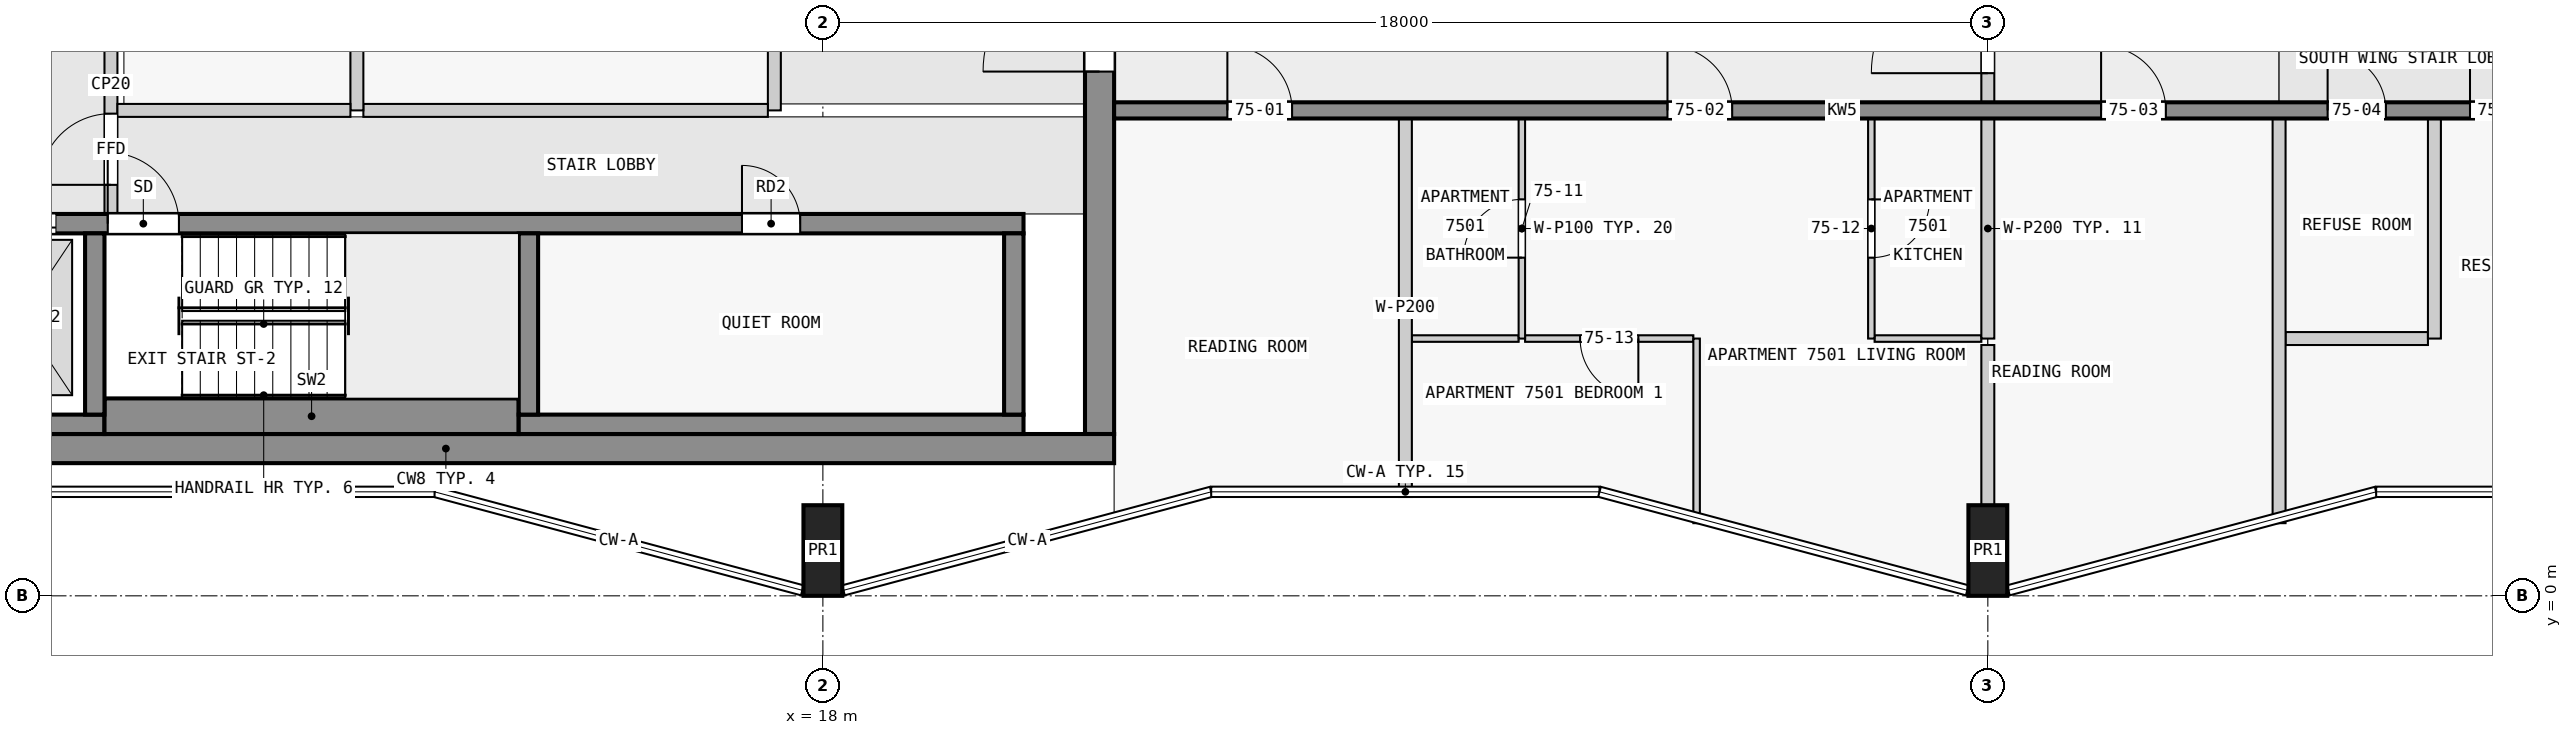
"""IFC4 building model, lengths in metres.
Left out: names, types, materials, properties, quantities, classifications, styles, units other than length and angle.
Written with IfcOpenShell. Run it as: python <this file> out.ifc"""

import sys

from ifc_helpers import new_model, si_unit, direction, frame, frame_2d, origin, origin_2d, place, context, subcontext, project, spatial, rectangle, extrude, element, fill, save


model = new_model("IFC4")
c1 = context("Model", 3, precision=1e-05, world=origin(), true_north=direction((0.0, 1.0)))
c2 = subcontext(c1, "Body", "Model", "MODEL_VIEW")
j1 = project(units=[si_unit("LENGTHUNIT", "METRE"), si_unit("PLANEANGLEUNIT", "RADIAN")], contexts=[c1])
p1 = place(None, origin())
s1 = spatial("IfcSite", under=j1, at=p1, CompositionType="ELEMENT")
p2 = place(p1, origin())
s2 = spatial("IfcBuilding", under=s1, at=p2, CompositionType="ELEMENT")
p3 = place(p2, frame((0.0, 0.0, 284.4)))
s3 = spatial("IfcBuildingStorey", under=s2, at=p3, CompositionType="ELEMENT", Elevation=284.4)
for number, where, z_axis, x_axis in (
    (1, (18.0, 0.7, 0.0), (0.0, 0.0, 1.0), (1.0, 0.0, 0.0)),
    (2, (36.0, 0.7, 0.0), (0.0, 0.0, 1.0), (1.0, 0.0, 0.0)),
):
    element("IfcColumn", number, at=place(p3, frame(where, z_axis=z_axis, x_axis=x_axis)), inside=s3, PredefinedType="COLUMN", context=c2, shape_type="SweptSolid", body=[
        extrude(rectangle(XDim=0.6, YDim=1.4, at=origin_2d()), origin(), (0.0, 0.0, 1.0), 3.5),
    ])
p4 = place(p3, frame((1.85, 2.275, 0.0), z_axis=(0.0, 0.0, 1.0), x_axis=(1.0, 0.0, 0.0)))
e3 = element("IfcWall", 3, at=p4, inside=s3, PredefinedType="SHEAR", context=c2, shape_type="SweptSolid", body=[
    extrude(rectangle(XDim=20.65, YDim=0.45, at=frame_2d((10.325, 0.0))), origin(), (0.0, 0.0, 1.0), 3.05),
])
p5 = place(p3, frame((22.275, 2.5, 0.0), z_axis=(0.0, 0.0, 1.0), x_axis=(0.0, 1.0, 0.0)))
e4 = element("IfcWall", 4, at=p5, inside=s3, PredefinedType="SHEAR", context=c2, shape_type="SweptSolid", body=[
    extrude(rectangle(XDim=15.05, YDim=0.45, at=frame_2d((7.525, 0.0))), origin(), (0.0, 0.0, 1.0), 3.05),
])
p6 = place(p5, frame((5.6, 0.0, 0.0)))
e5 = element("IfcOpeningElement", 5, at=p6, cuts=e4, PredefinedType="OPENING", context=c2, shape_type="SweptSolid", body=[
    extrude(rectangle(XDim=1.8, YDim=2.1, at=frame_2d((0.9, 1.05))), frame((0.0, 0.235, 0.0), z_axis=(0.0, -1.0, 0.0), x_axis=(1.0, 0.0, 0.0)), (0.0, 0.0, 1.0), 0.47),
])
p7 = place(p3, frame((2.3, 2.65, 0.0), z_axis=(0.0, 0.0, 1.0), x_axis=(1.0, 0.0, 0.0)))
e6 = element("IfcWall", 6, at=p7, inside=s3, PredefinedType="SHEAR", context=c2, shape_type="SweptSolid", body=[
    extrude(rectangle(XDim=4.6, YDim=0.3, at=frame_2d((2.3, 0.0))), origin(), (0.0, 0.0, 1.0), 3.05),
])
p8 = place(p3, frame((6.9, 2.775, 0.0), z_axis=(0.0, 0.0, 1.0), x_axis=(1.0, 0.0, 0.0)))
e7 = element("IfcWall", 7, at=p8, inside=s3, PredefinedType="SHEAR", context=c2, shape_type="SweptSolid", body=[
    extrude(rectangle(XDim=6.4, YDim=0.55, at=frame_2d((3.2, 0.0))), origin(), (0.0, 0.0, 1.0), 3.05),
])
p9 = place(p3, frame((13.3, 2.65, 0.0), z_axis=(0.0, 0.0, 1.0), x_axis=(1.0, 0.0, 0.0)))
e8 = element("IfcWall", 8, at=p9, inside=s3, PredefinedType="SHEAR", context=c2, shape_type="SweptSolid", body=[
    extrude(rectangle(XDim=7.8, YDim=0.3, at=frame_2d((3.9, 0.0))), origin(), (0.0, 0.0, 1.0), 3.05),
])
for number, where, z_axis, x_axis in (
    (9, (6.75, 2.8, 0.0), (0.0, 0.0, 1.0), (0.0, 1.0, 0.0)),
    (10, (13.45, 2.8, 0.0), (0.0, 0.0, 1.0), (0.0, 1.0, 0.0)),
    (11, (20.95, 2.8, 0.0), (0.0, 0.0, 1.0), (0.0, 1.0, 0.0)),
):
    element("IfcWall", number, at=place(p3, frame(where, z_axis=z_axis, x_axis=x_axis)), inside=s3, PredefinedType="SHEAR", context=c2, shape_type="SweptSolid", body=[
        extrude(rectangle(XDim=2.8, YDim=0.3, at=frame_2d((1.4, 0.0))), origin(), (0.0, 0.0, 1.0), 3.05),
    ])
p10 = place(p3, frame((2.3, 5.75, 0.0), z_axis=(0.0, 0.0, 1.0), x_axis=(1.0, 0.0, 0.0)))
e12 = element("IfcWall", 12, at=p10, inside=s3, PredefinedType="SHEAR", context=c2, shape_type="SweptSolid", body=[
    extrude(rectangle(XDim=18.8, YDim=0.3, at=frame_2d((9.4, 0.0))), origin(), (0.0, 0.0, 1.0), 3.05),
])
p11 = place(p10, frame((4.65, 0.0, 0.0)))
e13 = element("IfcOpeningElement", 13, at=p11, cuts=e12, PredefinedType="OPENING", context=c2, shape_type="SweptSolid", body=[
    extrude(rectangle(XDim=1.1, YDim=2.1, at=frame_2d((0.55, 1.05))), frame((0.0, 0.16, 0.0), z_axis=(0.0, -1.0, 0.0), x_axis=(1.0, 0.0, 0.0)), (0.0, 0.0, 1.0), 0.32),
])
p12 = place(p10, frame((0.45, 0.0, 0.0)))
e14 = element("IfcOpeningElement", 14, at=p12, cuts=e12, PredefinedType="OPENING", context=c2, shape_type="SweptSolid", body=[
    extrude(rectangle(XDim=1.1, YDim=2.1, at=frame_2d((0.55, 1.05))), frame((0.0, 0.16, 0.0), z_axis=(0.0, -1.0, 0.0), x_axis=(1.0, 0.0, 0.0)), (0.0, 0.0, 1.0), 0.32),
])
p13 = place(p10, frame((2.75, 0.0, 0.0)))
e15 = element("IfcOpeningElement", 15, at=p13, cuts=e12, PredefinedType="OPENING", context=c2, shape_type="SweptSolid", body=[
    extrude(rectangle(XDim=1.1, YDim=2.1, at=frame_2d((0.55, 1.05))), frame((0.0, 0.16, 0.0), z_axis=(0.0, -1.0, 0.0), x_axis=(1.0, 0.0, 0.0)), (0.0, 0.0, 1.0), 0.32),
])
p14 = place(p10, frame((14.45, 0.0, 0.0)))
e16 = element("IfcOpeningElement", 16, at=p14, cuts=e12, PredefinedType="OPENING", context=c2, shape_type="SweptSolid", body=[
    extrude(rectangle(XDim=0.9, YDim=2.1, at=frame_2d((0.45, 1.05))), frame((0.0, 0.16, 0.0), z_axis=(0.0, -1.0, 0.0), x_axis=(1.0, 0.0, 0.0)), (0.0, 0.0, 1.0), 0.32),
])
p15 = place(p3, frame((22.5, 7.5, 0.0), z_axis=(0.0, 0.0, 1.0), x_axis=(1.0, 0.0, 0.0)))
e17 = element("IfcWall", 17, at=p15, inside=s3, PredefinedType="SHEAR", context=c2, shape_type="SweptSolid", body=[
    extrude(rectangle(XDim=22.5, YDim=0.25, at=frame_2d((11.25, 0.0))), origin(), (0.0, 0.0, 1.0), 3.05),
])
p16 = place(p15, frame((1.75, 0.0, 0.0)))
e18 = element("IfcOpeningElement", 18, at=p16, cuts=e17, PredefinedType="OPENING", context=c2, shape_type="SweptSolid", body=[
    extrude(rectangle(XDim=1.0, YDim=2.1, at=frame_2d((0.5, 1.05))), frame((0.0, 0.135, 0.0), z_axis=(0.0, -1.0, 0.0), x_axis=(1.0, 0.0, 0.0)), (0.0, 0.0, 1.0), 0.27),
])
p17 = place(p15, frame((8.55, 0.0, 0.0)))
e19 = element("IfcOpeningElement", 19, at=p17, cuts=e17, PredefinedType="OPENING", context=c2, shape_type="SweptSolid", body=[
    extrude(rectangle(XDim=1.0, YDim=2.1, at=frame_2d((0.5, 1.05))), frame((0.0, 0.135, 0.0), z_axis=(0.0, -1.0, 0.0), x_axis=(1.0, 0.0, 0.0)), (0.0, 0.0, 1.0), 0.27),
])
p18 = place(p15, frame((15.25, 0.0, 0.0)))
e20 = element("IfcOpeningElement", 20, at=p18, cuts=e17, PredefinedType="OPENING", context=c2, shape_type="SweptSolid", body=[
    extrude(rectangle(XDim=1.0, YDim=2.1, at=frame_2d((0.5, 1.05))), frame((0.0, 0.135, 0.0), z_axis=(0.0, -1.0, 0.0), x_axis=(1.0, 0.0, 0.0)), (0.0, 0.0, 1.0), 0.27),
])
p19 = place(p15, frame((18.75, 0.0, 0.0)))
e21 = element("IfcOpeningElement", 21, at=p19, cuts=e17, PredefinedType="OPENING", context=c2, shape_type="SweptSolid", body=[
    extrude(rectangle(XDim=0.9, YDim=2.1, at=frame_2d((0.45, 1.05))), frame((0.0, 0.135, 0.0), z_axis=(0.0, -1.0, 0.0), x_axis=(1.0, 0.0, 0.0)), (0.0, 0.0, 1.0), 0.27),
])
p20 = place(p15, frame((20.95, 0.0, 0.0)))
e22 = element("IfcOpeningElement", 22, at=p20, cuts=e17, PredefinedType="OPENING", context=c2, shape_type="SweptSolid", body=[
    extrude(rectangle(XDim=1.0, YDim=2.1, at=frame_2d((0.5, 1.05))), frame((0.0, 0.135, 0.0), z_axis=(0.0, -1.0, 0.0), x_axis=(1.0, 0.0, 0.0)), (0.0, 0.0, 1.0), 0.27),
])
p21 = place(p3, frame((7.0, 5.9, 0.0), z_axis=(0.0, 0.0, 1.0), x_axis=(0.0, 1.0, 0.0)))
e23 = element("IfcWall", 23, at=p21, inside=s3, PredefinedType="PARTITIONING", context=c2, shape_type="SweptSolid", body=[
    extrude(rectangle(XDim=4.0, YDim=0.2, at=frame_2d((2.0, 0.0))), origin(), (0.0, 0.0, 1.0), 3.05),
])
p22 = place(p21, frame((0.45, 0.0, 0.0)))
e24 = element("IfcOpeningElement", 24, at=p22, cuts=e23, PredefinedType="OPENING", context=c2, shape_type="SweptSolid", body=[
    extrude(rectangle(XDim=1.1, YDim=2.1, at=frame_2d((0.55, 1.05))), frame((0.0, 0.11, 0.0), z_axis=(0.0, -1.0, 0.0), x_axis=(1.0, 0.0, 0.0)), (0.0, 0.0, 1.0), 0.22),
])
p23 = place(p3, frame((7.1, 7.5, 0.0), z_axis=(0.0, 0.0, 1.0), x_axis=(1.0, 0.0, 0.0)))
e25 = element("IfcWall", 25, at=p23, inside=s3, PredefinedType="PARTITIONING", context=c2, shape_type="SweptSolid", body=[
    extrude(rectangle(XDim=3.6, YDim=0.2, at=frame_2d((1.8, 0.0))), origin(), (0.0, 0.0, 1.0), 3.05),
])
p24 = place(p3, frame((10.8, 7.5, 0.0), z_axis=(0.0, 0.0, 1.0), x_axis=(0.0, 1.0, 0.0)))
e26 = element("IfcWall", 26, at=p24, inside=s3, PredefinedType="PARTITIONING", context=c2, shape_type="SweptSolid", body=[
    extrude(rectangle(XDim=4.7, YDim=0.2, at=frame_2d((2.35, 0.0))), origin(), (0.0, 0.0, 1.0), 3.05),
])
p25 = place(p3, frame((10.9, 7.5, 0.0), z_axis=(0.0, 0.0, 1.0), x_axis=(1.0, 0.0, 0.0)))
e27 = element("IfcWall", 27, at=p25, inside=s3, PredefinedType="PARTITIONING", context=c2, shape_type="SweptSolid", body=[
    extrude(rectangle(XDim=6.25, YDim=0.2, at=frame_2d((3.125, 0.0))), origin(), (0.0, 0.0, 1.0), 3.05),
])
p26 = place(p3, frame((17.25, 7.5, 0.0), z_axis=(0.0, 0.0, 1.0), x_axis=(0.0, 1.0, 0.0)))
e28 = element("IfcWall", 28, at=p26, inside=s3, PredefinedType="PARTITIONING", context=c2, shape_type="SweptSolid", body=[
    extrude(rectangle(XDim=4.7, YDim=0.2, at=frame_2d((2.35, 0.0))), origin(), (0.0, 0.0, 1.0), 3.05),
])
p27 = place(p3, frame((31.45, 3.975, 0.0), z_axis=(0.0, 0.0, 1.0), x_axis=(-1.0, 0.0, 0.0)))
e29 = element("IfcWall", 29, at=p27, inside=s3, PredefinedType="PARTITIONING", context=c2, shape_type="SweptSolid", body=[
    extrude(rectangle(XDim=2.6, YDim=0.1, at=frame_2d((1.3, 0.0))), origin(), (0.0, 0.0, 1.0), 3.05),
])
p28 = place(p27, frame((0.85, 0.0, 0.0)))
e30 = element("IfcOpeningElement", 30, at=p28, cuts=e29, PredefinedType="OPENING", context=c2, shape_type="SweptSolid", body=[
    extrude(rectangle(XDim=0.9, YDim=2.1, at=frame_2d((0.45, 1.05))), frame((0.0, 0.06, 0.0), z_axis=(0.0, -1.0, 0.0), x_axis=(1.0, 0.0, 0.0)), (0.0, 0.0, 1.0), 0.12),
])
for number, where, z_axis, x_axis in (
    (31, (27.1, 3.975, 0.0), (0.0, 0.0, 1.0), (1.0, 0.0, 0.0)),
    (32, (34.25, 3.975, 0.0), (0.0, 0.0, 1.0), (1.0, 0.0, 0.0)),
):
    element("IfcWall", number, at=place(p3, frame(where, z_axis=z_axis, x_axis=x_axis)), inside=s3, PredefinedType="PARTITIONING", context=c2, shape_type="SweptSolid", body=[
        extrude(rectangle(XDim=1.65, YDim=0.1, at=frame_2d((0.825, 0.0))), origin(), (0.0, 0.0, 1.0), 3.05),
    ])
p29 = place(p3, frame((40.6, 3.975, 0.0), z_axis=(0.0, 0.0, 1.0), x_axis=(1.0, 0.0, 0.0)))
e33 = element("IfcWall", 33, at=p29, inside=s3, PredefinedType="PARTITIONING", context=c2, shape_type="SweptSolid", body=[
    extrude(rectangle(XDim=2.2, YDim=0.2, at=frame_2d((1.1, 0.0))), origin(), (0.0, 0.0, 1.0), 3.05),
])
p30 = place(p3, frame((27.0, 1.527, 0.0), z_axis=(0.0, 0.0, 1.0), x_axis=(0.0, 1.0, 0.0)))
e34 = element("IfcWall", 34, at=p30, inside=s3, PredefinedType="PARTITIONING", context=c2, shape_type="SweptSolid", body=[
    extrude(rectangle(XDim=5.848, YDim=0.2, at=frame_2d((2.924, 0.0))), origin(), (0.0, 0.0, 1.0), 3.05),
])
p31 = place(p3, frame((28.8, 3.975, 0.0), z_axis=(0.0, 0.0, 1.0), x_axis=(0.0, 1.0, 0.0)))
e35 = element("IfcWall", 35, at=p31, inside=s3, PredefinedType="PARTITIONING", context=c2, shape_type="SweptSolid", body=[
    extrude(rectangle(XDim=3.4, YDim=0.1, at=frame_2d((1.7, 0.0))), origin(), (0.0, 0.0, 1.0), 3.05),
])
p32 = place(p31, frame((1.25, 0.0, 0.0)))
e36 = element("IfcOpeningElement", 36, at=p32, cuts=e35, PredefinedType="OPENING", context=c2, shape_type="SweptSolid", body=[
    extrude(rectangle(XDim=0.9, YDim=2.1, at=frame_2d((0.45, 1.05))), frame((0.0, 0.06, 0.0), z_axis=(0.0, -1.0, 0.0), x_axis=(1.0, 0.0, 0.0)), (0.0, 0.0, 1.0), 0.12),
])
p33 = place(p3, frame((31.5, 1.122, 0.0), z_axis=(0.0, 0.0, 1.0), x_axis=(0.0, 1.0, 0.0)))
e37 = element("IfcWall", 37, at=p33, inside=s3, PredefinedType="PARTITIONING", context=c2, shape_type="SweptSolid", body=[
    extrude(rectangle(XDim=2.853, YDim=0.1, at=frame_2d((1.426, 0.0))), origin(), (0.0, 0.0, 1.0), 3.05),
])
p34 = place(p3, frame((34.2, 7.375, 0.0), z_axis=(0.0, 0.0, 1.0), x_axis=(0.0, -1.0, 0.0)))
e38 = element("IfcWall", 38, at=p34, inside=s3, PredefinedType="PARTITIONING", context=c2, shape_type="SweptSolid", body=[
    extrude(rectangle(XDim=3.4, YDim=0.1, at=frame_2d((1.7, 0.0))), origin(), (0.0, 0.0, 1.0), 3.05),
])
p35 = place(p34, frame((1.25, 0.0, 0.0)))
e39 = element("IfcOpeningElement", 39, at=p35, cuts=e38, PredefinedType="OPENING", context=c2, shape_type="SweptSolid", body=[
    extrude(rectangle(XDim=0.9, YDim=2.1, at=frame_2d((0.45, 1.05))), frame((0.0, 0.06, 0.0), z_axis=(0.0, -1.0, 0.0), x_axis=(1.0, 0.0, 0.0)), (0.0, 0.0, 1.0), 0.12),
])
p36 = place(p3, frame((36.0, 3.875, 0.0), z_axis=(0.0, 0.0, 1.0), x_axis=(0.0, -1.0, 0.0)))
e40 = element("IfcWall", 40, at=p36, inside=s3, PredefinedType="PARTITIONING", context=c2, shape_type="SweptSolid", body=[
    extrude(rectangle(XDim=2.475, YDim=0.2, at=frame_2d((1.238, 0.0))), origin(), (0.0, 0.0, 1.0), 3.05),
])
p37 = place(p3, frame((36.0, 3.975, 0.0), z_axis=(0.0, 0.0, 1.0), x_axis=(0.0, 1.0, 0.0)))
e41 = element("IfcWall", 41, at=p37, inside=s3, PredefinedType="PARTITIONING", context=c2, shape_type="SweptSolid", body=[
    extrude(rectangle(XDim=3.4, YDim=0.2, at=frame_2d((1.7, 0.0))), origin(), (0.0, 0.0, 1.0), 3.05),
])
p38 = place(p3, frame((40.5, 1.122, 0.0), z_axis=(0.0, 0.0, 1.0), x_axis=(0.0, 1.0, 0.0)))
e42 = element("IfcWall", 42, at=p38, inside=s3, PredefinedType="PARTITIONING", context=c2, shape_type="SweptSolid", body=[
    extrude(rectangle(XDim=6.253, YDim=0.2, at=frame_2d((3.126, 0.0))), origin(), (0.0, 0.0, 1.0), 3.05),
])
p39 = place(p3, frame((42.9, 3.975, 0.0), z_axis=(0.0, 0.0, 1.0), x_axis=(0.0, 1.0, 0.0)))
e43 = element("IfcWall", 43, at=p39, inside=s3, PredefinedType="PARTITIONING", context=c2, shape_type="SweptSolid", body=[
    extrude(rectangle(XDim=3.4, YDim=0.2, at=frame_2d((1.7, 0.0))), origin(), (0.0, 0.0, 1.0), 3.05),
])
p40 = place(p3, frame((36.0, 7.475, 0.0), z_axis=(0.0, 0.0, 1.0), x_axis=(0.0, 1.0, 0.0)))
e44 = element("IfcWall", 44, at=p40, inside=s3, PredefinedType="PARTITIONING", context=c2, shape_type="SweptSolid", body=[
    extrude(rectangle(XDim=3.05, YDim=0.2, at=frame_2d((1.525, 0.0))), origin(), (0.0, 0.0, 1.0), 3.05),
])
p41 = place(p40, frame((0.6, 0.0, 0.0)))
e45 = element("IfcOpeningElement", 45, at=p41, cuts=e44, PredefinedType="OPENING", context=c2, shape_type="SweptSolid", body=[
    extrude(rectangle(XDim=1.8, YDim=2.1, at=frame_2d((0.9, 1.05))), frame((0.0, 0.11, 0.0), z_axis=(0.0, -1.0, 0.0), x_axis=(1.0, 0.0, 0.0)), (0.0, 0.0, 1.0), 0.22),
])
p42 = place(p22, origin())
e46 = element("IfcDoor", 46, at=p42, inside=s3, OperationType="SINGLE_SWING_LEFT", PredefinedType="DOOR", context=c2, shape_type="SweptSolid", body=[
    extrude(rectangle(XDim=1.1, YDim=2.1, at=frame_2d((0.55, 1.05))), frame((0.0, 0.025, 0.0), z_axis=(0.0, -1.0, 0.0), x_axis=(1.0, 0.0, 0.0)), (0.0, 0.0, 1.0), 0.05),
])
fill(e24, e46)
p43 = place(p11, origin())
e47 = element("IfcDoor", 47, at=p43, inside=s3, OperationType="SINGLE_SWING_LEFT", PredefinedType="DOOR", context=c2, shape_type="SweptSolid", body=[
    extrude(rectangle(XDim=1.1, YDim=2.1, at=frame_2d((0.55, 1.05))), frame((0.0, 0.025, 0.0), z_axis=(0.0, -1.0, 0.0), x_axis=(1.0, 0.0, 0.0)), (0.0, 0.0, 1.0), 0.05),
])
fill(e13, e47)
p44 = place(p13, origin())
e48 = element("IfcDoor", 48, at=p44, inside=s3, OperationType="DOUBLE_DOOR_SLIDING", PredefinedType="DOOR", context=c2, shape_type="SweptSolid", body=[
    extrude(rectangle(XDim=1.1, YDim=2.1, at=frame_2d((0.55, 1.05))), frame((0.0, 0.025, 0.0), z_axis=(0.0, -1.0, 0.0), x_axis=(1.0, 0.0, 0.0)), (0.0, 0.0, 1.0), 0.05),
])
fill(e15, e48)
p45 = place(p6, origin())
e49 = element("IfcDoor", 49, at=p45, inside=s3, OperationType="DOUBLE_DOOR_SINGLE_SWING", PredefinedType="DOOR", context=c2, shape_type="SweptSolid", body=[
    extrude(rectangle(XDim=1.8, YDim=2.1, at=frame_2d((0.9, 1.05))), frame((0.0, 0.025, 0.0), z_axis=(0.0, -1.0, 0.0), x_axis=(1.0, 0.0, 0.0)), (0.0, 0.0, 1.0), 0.05),
])
fill(e5, e49)
p46 = place(p14, origin())
e50 = element("IfcDoor", 50, at=p46, inside=s3, OperationType="SINGLE_SWING_LEFT", PredefinedType="DOOR", context=c2, shape_type="SweptSolid", body=[
    extrude(rectangle(XDim=0.9, YDim=2.1, at=frame_2d((0.45, 1.05))), frame((0.0, 0.025, 0.0), z_axis=(0.0, -1.0, 0.0), x_axis=(1.0, 0.0, 0.0)), (0.0, 0.0, 1.0), 0.05),
])
fill(e16, e50)
p47 = place(p16, origin())
e51 = element("IfcDoor", 51, at=p47, inside=s3, OperationType="SINGLE_SWING_LEFT", PredefinedType="DOOR", context=c2, shape_type="SweptSolid", body=[
    extrude(rectangle(XDim=1.0, YDim=2.1, at=frame_2d((0.5, 1.05))), frame((0.0, 0.025, 0.0), z_axis=(0.0, -1.0, 0.0), x_axis=(1.0, 0.0, 0.0)), (0.0, 0.0, 1.0), 0.05),
])
fill(e18, e51)
p48 = place(p17, origin())
e52 = element("IfcDoor", 52, at=p48, inside=s3, OperationType="SINGLE_SWING_LEFT", PredefinedType="DOOR", context=c2, shape_type="SweptSolid", body=[
    extrude(rectangle(XDim=1.0, YDim=2.1, at=frame_2d((0.5, 1.05))), frame((0.0, 0.025, 0.0), z_axis=(0.0, -1.0, 0.0), x_axis=(1.0, 0.0, 0.0)), (0.0, 0.0, 1.0), 0.05),
])
fill(e19, e52)
p49 = place(p18, origin())
e53 = element("IfcDoor", 53, at=p49, inside=s3, OperationType="SINGLE_SWING_RIGHT", PredefinedType="DOOR", context=c2, shape_type="SweptSolid", body=[
    extrude(rectangle(XDim=1.0, YDim=2.1, at=frame_2d((0.5, 1.05))), frame((0.0, 0.025, 0.0), z_axis=(0.0, -1.0, 0.0), x_axis=(1.0, 0.0, 0.0)), (0.0, 0.0, 1.0), 0.05),
])
fill(e20, e53)
p50 = place(p19, origin())
e54 = element("IfcDoor", 54, at=p50, inside=s3, OperationType="SINGLE_SWING_RIGHT", PredefinedType="DOOR", context=c2, shape_type="SweptSolid", body=[
    extrude(rectangle(XDim=0.9, YDim=2.1, at=frame_2d((0.45, 1.05))), frame((0.0, 0.025, 0.0), z_axis=(0.0, -1.0, 0.0), x_axis=(1.0, 0.0, 0.0)), (0.0, 0.0, 1.0), 0.05),
])
fill(e21, e54)
p51 = place(p20, origin())
e55 = element("IfcDoor", 55, at=p51, inside=s3, OperationType="SINGLE_SWING_RIGHT", PredefinedType="DOOR", context=c2, shape_type="SweptSolid", body=[
    extrude(rectangle(XDim=1.0, YDim=2.1, at=frame_2d((0.5, 1.05))), frame((0.0, 0.025, 0.0), z_axis=(0.0, -1.0, 0.0), x_axis=(1.0, 0.0, 0.0)), (0.0, 0.0, 1.0), 0.05),
])
fill(e22, e55)
p52 = place(p41, origin())
e56 = element("IfcDoor", 56, at=p52, inside=s3, OperationType="SINGLE_SWING_LEFT", PredefinedType="DOOR", context=c2, shape_type="SweptSolid", body=[
    extrude(rectangle(XDim=1.8, YDim=2.1, at=frame_2d((0.9, 1.05))), frame((0.0, 0.025, 0.0), z_axis=(0.0, -1.0, 0.0), x_axis=(1.0, 0.0, 0.0)), (0.0, 0.0, 1.0), 0.05),
])
fill(e45, e56)
p53 = place(p32, origin())
e57 = element("IfcDoor", 57, at=p53, inside=s3, OperationType="SINGLE_SWING_LEFT", PredefinedType="DOOR", context=c2, shape_type="SweptSolid", body=[
    extrude(rectangle(XDim=0.9, YDim=2.1, at=frame_2d((0.45, 1.05))), frame((0.0, 0.025, 0.0), z_axis=(0.0, -1.0, 0.0), x_axis=(1.0, 0.0, 0.0)), (0.0, 0.0, 1.0), 0.05),
])
fill(e36, e57)
p54 = place(p35, origin())
e58 = element("IfcDoor", 58, at=p54, inside=s3, OperationType="SINGLE_SWING_LEFT", PredefinedType="DOOR", context=c2, shape_type="SweptSolid", body=[
    extrude(rectangle(XDim=0.9, YDim=2.1, at=frame_2d((0.45, 1.05))), frame((0.0, 0.025, 0.0), z_axis=(0.0, -1.0, 0.0), x_axis=(1.0, 0.0, 0.0)), (0.0, 0.0, 1.0), 0.05),
])
fill(e39, e58)
p55 = place(p28, origin())
e59 = element("IfcDoor", 59, at=p55, inside=s3, OperationType="SINGLE_SWING_RIGHT", PredefinedType="DOOR", context=c2, shape_type="SweptSolid", body=[
    extrude(rectangle(XDim=0.9, YDim=2.1, at=frame_2d((0.45, 1.05))), frame((0.0, 0.025, 0.0), z_axis=(0.0, -1.0, 0.0), x_axis=(1.0, 0.0, 0.0)), (0.0, 0.0, 1.0), 0.05),
])
fill(e30, e59)
save(model, sys.argv[1])
